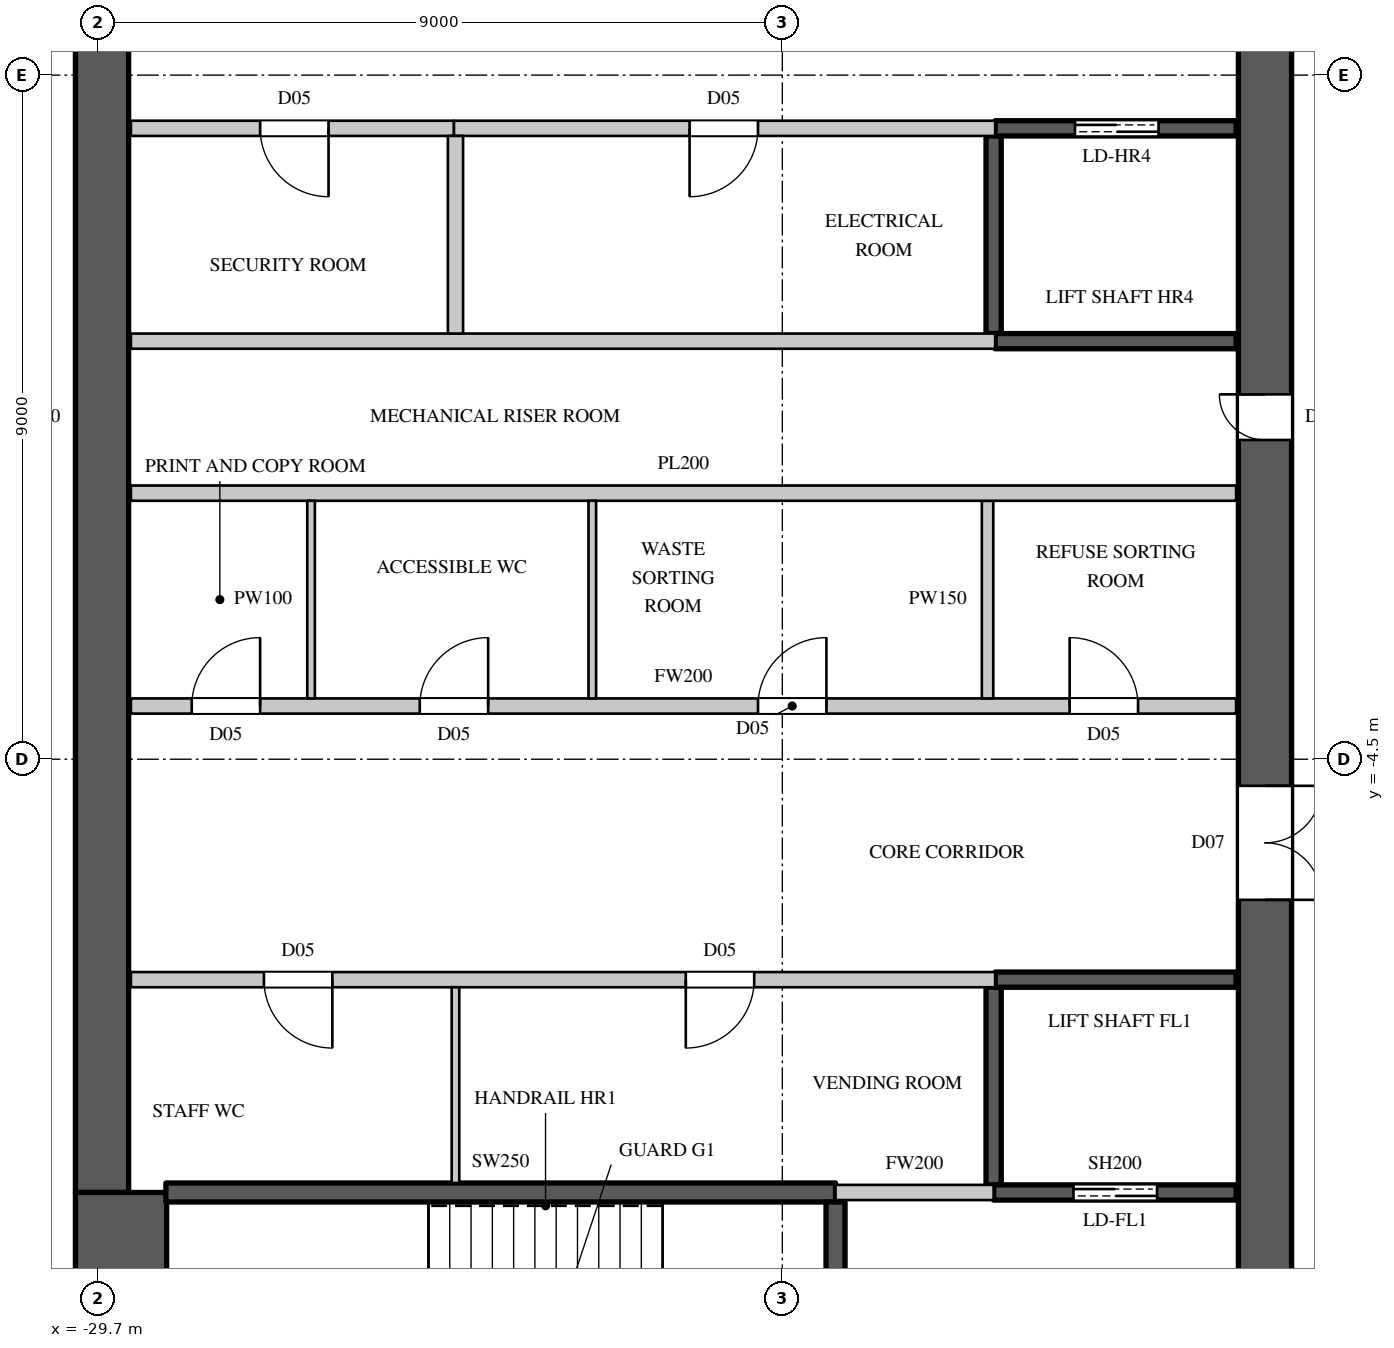
"""IFC4 building model, lengths in metres.
Left out: names, types, materials, properties, quantities, classifications, styles, units other than length and angle.
Written with IfcOpenShell. Run it as: python <this file> out.ifc"""

import sys

from ifc_helpers import new_model, si_unit, direction, frame, frame_2d, origin, place, context, subcontext, project, spatial, rectangle, extrude, element, fill, save


model = new_model("IFC4")
c1 = context("Model", 3, precision=1e-05, world=origin(), true_north=direction((0.0, 1.0)))
c2 = subcontext(c1, "Body", "Model", "MODEL_VIEW")
j1 = project(units=[si_unit("LENGTHUNIT", "METRE"), si_unit("PLANEANGLEUNIT", "RADIAN")], contexts=[c1])
p1 = place(None, origin())
s1 = spatial("IfcSite", under=j1, at=p1, CompositionType="ELEMENT")
p2 = place(p1, origin())
s2 = spatial("IfcBuilding", under=s1, at=p2, CompositionType="ELEMENT")
p3 = place(p2, frame((0.0, 0.0, 272.1)))
s3 = spatial("IfcBuildingStorey", under=s2, at=p3, CompositionType="ELEMENT", Elevation=272.1)
p4 = place(p3, frame((-14.35, -14.8, 0.0), z_axis=(0.0, 0.0, 1.0), x_axis=(0.0, 1.0, 0.0)))
e1 = element("IfcWall", 1, at=p4, inside=s3, PredefinedType="SHEAR", context=c2, shape_type="SweptSolid", body=[
    extrude(rectangle(XDim=29.6, YDim=0.7, at=frame_2d((14.8, 0.0))), origin(), (0.0, 0.0, 1.0), 4.1),
])
p5 = place(p4, frame((1.55, 0.0, 0.0)))
e2 = element("IfcOpeningElement", 2, at=p5, cuts=e1, PredefinedType="OPENING", context=c2, shape_type="SweptSolid", body=[
    extrude(rectangle(XDim=1.5, YDim=2.4, at=frame_2d((0.75, 1.2))), frame((0.0, 0.36, 0.0), z_axis=(0.0, -1.0, 0.0), x_axis=(1.0, 0.0, 0.0)), (0.0, 0.0, 1.0), 0.72),
])
p6 = place(p4, frame((26.55, 0.0, 0.0)))
e3 = element("IfcOpeningElement", 3, at=p6, cuts=e1, PredefinedType="OPENING", context=c2, shape_type="SweptSolid", body=[
    extrude(rectangle(XDim=1.5, YDim=2.4, at=frame_2d((0.75, 1.2))), frame((0.0, 0.36, 0.0), z_axis=(0.0, -1.0, 0.0), x_axis=(1.0, 0.0, 0.0)), (0.0, 0.0, 1.0), 0.72),
])
p7 = place(p4, frame((8.45, 0.0, 0.0)))
e4 = element("IfcOpeningElement", 4, at=p7, cuts=e1, PredefinedType="OPENING", context=c2, shape_type="SweptSolid", body=[
    extrude(rectangle(XDim=1.5, YDim=2.4, at=frame_2d((0.75, 1.2))), frame((0.0, 0.36, 0.0), z_axis=(0.0, -1.0, 0.0), x_axis=(1.0, 0.0, 0.0)), (0.0, 0.0, 1.0), 0.72),
])
p8 = place(p4, frame((19.65, 0.0, 0.0)))
e5 = element("IfcOpeningElement", 5, at=p8, cuts=e1, PredefinedType="OPENING", context=c2, shape_type="SweptSolid", body=[
    extrude(rectangle(XDim=1.5, YDim=2.4, at=frame_2d((0.75, 1.2))), frame((0.0, 0.36, 0.0), z_axis=(0.0, -1.0, 0.0), x_axis=(1.0, 0.0, 0.0)), (0.0, 0.0, 1.0), 0.72),
])
p9 = place(p4, frame((14.5, 0.0, 0.0)))
e6 = element("IfcOpeningElement", 6, at=p9, cuts=e1, PredefinedType="OPENING", context=c2, shape_type="SweptSolid", body=[
    extrude(rectangle(XDim=0.6, YDim=2.0, at=frame_2d((0.3, 1.0))), frame((0.0, 0.36, 0.0), z_axis=(0.0, -1.0, 0.0), x_axis=(1.0, 0.0, 0.0)), (0.0, 0.0, 1.0), 0.72),
])
p10 = place(p3, frame((-29.65, -10.2, 0.0), z_axis=(0.0, 0.0, 1.0), x_axis=(0.0, 1.0, 0.0)))
e7 = element("IfcWall", 7, at=p10, inside=s3, PredefinedType="SHEAR", context=c2, shape_type="SweptSolid", body=[
    extrude(rectangle(XDim=20.4, YDim=0.7, at=frame_2d((10.2, 0.0))), origin(), (0.0, 0.0, 1.0), 4.1),
])
p11 = place(p3, frame((-29.4, -14.8, 0.0), z_axis=(0.0, 0.0, 1.0), x_axis=(0.0, 1.0, 0.0)))
e8 = element("IfcWall", 8, at=p11, inside=s3, PredefinedType="SHEAR", context=c2, shape_type="SweptSolid", body=[
    extrude(rectangle(XDim=4.6, YDim=1.2, at=frame_2d((2.3, 0.0))), origin(), (0.0, 0.0, 1.0), 4.1),
])
p12 = place(p3, frame((-29.27, -7.4, 0.0), z_axis=(0.0, 0.0, 1.0), x_axis=(1.0, 0.0, 0.0)))
e9 = element("IfcWall", 9, at=p12, inside=s3, PredefinedType="PARTITIONING", context=c2, shape_type="SweptSolid", body=[
    extrude(rectangle(XDim=11.37, YDim=0.2, at=frame_2d((5.685, 0.0))), origin(), (0.0, 0.0, 1.0), 3.8),
])
p13 = place(p12, frame((1.75, 0.0, 0.0)))
e10 = element("IfcOpeningElement", 10, at=p13, cuts=e9, PredefinedType="OPENING", context=c2, shape_type="SweptSolid", body=[
    extrude(rectangle(XDim=0.9, YDim=2.2, at=frame_2d((0.45, 1.1))), frame((0.0, 0.11, 0.0), z_axis=(0.0, -1.0, 0.0), x_axis=(1.0, 0.0, 0.0)), (0.0, 0.0, 1.0), 0.22),
])
p14 = place(p12, frame((7.3, 0.0, 0.0)))
e11 = element("IfcOpeningElement", 11, at=p14, cuts=e9, PredefinedType="OPENING", context=c2, shape_type="SweptSolid", body=[
    extrude(rectangle(XDim=0.9, YDim=2.2, at=frame_2d((0.45, 1.1))), frame((0.0, 0.11, 0.0), z_axis=(0.0, -1.0, 0.0), x_axis=(1.0, 0.0, 0.0)), (0.0, 0.0, 1.0), 0.22),
])
p15 = place(p3, frame((-29.27, -3.8, 0.0), z_axis=(0.0, 0.0, 1.0), x_axis=(1.0, 0.0, 0.0)))
e12 = element("IfcWall", 12, at=p15, inside=s3, PredefinedType="PARTITIONING", context=c2, shape_type="SweptSolid", body=[
    extrude(rectangle(XDim=14.54, YDim=0.2, at=frame_2d((7.27, 0.0))), origin(), (0.0, 0.0, 1.0), 3.8),
])
p16 = place(p15, frame((0.8, 0.0, 0.0)))
e13 = element("IfcOpeningElement", 13, at=p16, cuts=e12, PredefinedType="OPENING", context=c2, shape_type="SweptSolid", body=[
    extrude(rectangle(XDim=0.9, YDim=2.2, at=frame_2d((0.45, 1.1))), frame((0.0, 0.11, 0.0), z_axis=(0.0, -1.0, 0.0), x_axis=(1.0, 0.0, 0.0)), (0.0, 0.0, 1.0), 0.22),
])
p17 = place(p15, frame((3.8, 0.0, 0.0)))
e14 = element("IfcOpeningElement", 14, at=p17, cuts=e12, PredefinedType="OPENING", context=c2, shape_type="SweptSolid", body=[
    extrude(rectangle(XDim=0.9, YDim=2.2, at=frame_2d((0.45, 1.1))), frame((0.0, 0.11, 0.0), z_axis=(0.0, -1.0, 0.0), x_axis=(1.0, 0.0, 0.0)), (0.0, 0.0, 1.0), 0.22),
])
p18 = place(p15, frame((8.25, 0.0, 0.0)))
e15 = element("IfcOpeningElement", 15, at=p18, cuts=e12, PredefinedType="OPENING", context=c2, shape_type="SweptSolid", body=[
    extrude(rectangle(XDim=0.9, YDim=2.2, at=frame_2d((0.45, 1.1))), frame((0.0, 0.11, 0.0), z_axis=(0.0, -1.0, 0.0), x_axis=(1.0, 0.0, 0.0)), (0.0, 0.0, 1.0), 0.22),
])
p19 = place(p15, frame((12.35, 0.0, 0.0)))
e16 = element("IfcOpeningElement", 16, at=p19, cuts=e12, PredefinedType="OPENING", context=c2, shape_type="SweptSolid", body=[
    extrude(rectangle(XDim=0.9, YDim=2.2, at=frame_2d((0.45, 1.1))), frame((0.0, 0.11, 0.0), z_axis=(0.0, -1.0, 0.0), x_axis=(1.0, 0.0, 0.0)), (0.0, 0.0, 1.0), 0.22),
])
p20 = place(p3, frame((-29.27, 3.8, 0.0), z_axis=(0.0, 0.0, 1.0), x_axis=(1.0, 0.0, 0.0)))
e17 = element("IfcWall", 17, at=p20, inside=s3, PredefinedType="PARTITIONING", context=c2, shape_type="SweptSolid", body=[
    extrude(rectangle(XDim=4.25, YDim=0.2, at=frame_2d((2.125, 0.0))), origin(), (0.0, 0.0, 1.0), 3.8),
])
p21 = place(p20, frame((1.7, 0.0, 0.0)))
e18 = element("IfcOpeningElement", 18, at=p21, cuts=e17, PredefinedType="OPENING", context=c2, shape_type="SweptSolid", body=[
    extrude(rectangle(XDim=0.9, YDim=2.2, at=frame_2d((0.45, 1.1))), frame((0.0, 0.11, 0.0), z_axis=(0.0, -1.0, 0.0), x_axis=(1.0, 0.0, 0.0)), (0.0, 0.0, 1.0), 0.22),
])
p22 = place(p3, frame((-20.0, -10.2, 0.0), z_axis=(0.0, 0.0, 1.0), x_axis=(1.0, 0.0, 0.0)))
e19 = element("IfcWall", 19, at=p22, inside=s3, PredefinedType="PARTITIONING", context=c2, shape_type="SweptSolid", body=[
    extrude(rectangle(XDim=2.08, YDim=0.2, at=frame_2d((1.04, 0.0))), origin(), (0.0, 0.0, 1.0), 3.8),
])
p23 = place(p3, frame((-18.0, -3.7, 0.0), z_axis=(0.0, 0.0, 1.0), x_axis=(0.0, 1.0, 0.0)))
e20 = element("IfcWall", 20, at=p23, inside=s3, PredefinedType="PARTITIONING", context=c2, shape_type="SweptSolid", body=[
    extrude(rectangle(XDim=2.6, YDim=0.15, at=frame_2d((1.3, 0.0))), origin(), (0.0, 0.0, 1.0), 3.8),
])
p24 = place(p3, frame((-29.27, -1.0, 0.0), z_axis=(0.0, 0.0, 1.0), x_axis=(1.0, 0.0, 0.0)))
e21 = element("IfcWall", 21, at=p24, inside=s3, PredefinedType="PARTITIONING", context=c2, shape_type="SweptSolid", body=[
    extrude(rectangle(XDim=14.54, YDim=0.2, at=frame_2d((7.27, 0.0))), origin(), (0.0, 0.0, 1.0), 3.8),
])
p25 = place(p3, frame((-29.27, 1.0, 0.0), z_axis=(0.0, 0.0, 1.0), x_axis=(1.0, 0.0, 0.0)))
e22 = element("IfcWall", 22, at=p25, inside=s3, PredefinedType="PARTITIONING", context=c2, shape_type="SweptSolid", body=[
    extrude(rectangle(XDim=11.37, YDim=0.2, at=frame_2d((5.685, 0.0))), origin(), (0.0, 0.0, 1.0), 3.8),
])
p26 = place(p3, frame((-25.02, 3.8, 0.0), z_axis=(0.0, 0.0, 1.0), x_axis=(1.0, 0.0, 0.0)))
e23 = element("IfcWall", 23, at=p26, inside=s3, PredefinedType="PARTITIONING", context=c2, shape_type="SweptSolid", body=[
    extrude(rectangle(XDim=7.12, YDim=0.2, at=frame_2d((3.56, 0.0))), origin(), (0.0, 0.0, 1.0), 3.8),
])
p27 = place(p26, frame((3.1, 0.0, 0.0)))
e24 = element("IfcOpeningElement", 24, at=p27, cuts=e23, PredefinedType="OPENING", context=c2, shape_type="SweptSolid", body=[
    extrude(rectangle(XDim=0.9, YDim=2.2, at=frame_2d((0.45, 1.1))), frame((0.0, 0.11, 0.0), z_axis=(0.0, -1.0, 0.0), x_axis=(1.0, 0.0, 0.0)), (0.0, 0.0, 1.0), 0.22),
])
p28 = place(p3, frame((-25.0, 1.1, 0.0), z_axis=(0.0, 0.0, 1.0), x_axis=(0.0, 1.0, 0.0)))
e25 = element("IfcWall", 25, at=p28, inside=s3, PredefinedType="PARTITIONING", context=c2, shape_type="SweptSolid", body=[
    extrude(rectangle(XDim=2.6, YDim=0.2, at=frame_2d((1.3, 0.0))), origin(), (0.0, 0.0, 1.0), 3.8),
])
p29 = place(p3, frame((-17.92, -10.1, 0.0), z_axis=(0.0, 0.0, 1.0), x_axis=(0.0, 1.0, 0.0)))
e26 = element("IfcWall", 26, at=p29, inside=s3, PredefinedType="SHEAR", context=c2, shape_type="SweptSolid", body=[
    extrude(rectangle(XDim=2.6, YDim=0.2, at=frame_2d((1.3, 0.0))), origin(), (0.0, 0.0, 1.0), 3.8),
])
p30 = place(p3, frame((-17.92, -10.2, 0.0), z_axis=(0.0, 0.0, 1.0), x_axis=(1.0, 0.0, 0.0)))
e27 = element("IfcWall", 27, at=p30, inside=s3, PredefinedType="SHEAR", context=c2, shape_type="SweptSolid", body=[
    extrude(rectangle(XDim=3.19, YDim=0.2, at=frame_2d((1.595, 0.0))), origin(), (0.0, 0.0, 1.0), 3.8),
])
p31 = place(p30, frame((1.05, 0.0, 0.0)))
e28 = element("IfcOpeningElement", 28, at=p31, cuts=e27, PredefinedType="OPENING", context=c2, shape_type="SweptSolid", body=[
    extrude(rectangle(XDim=1.1, YDim=2.2, at=frame_2d((0.55, 1.1))), frame((0.0, 0.11, 0.0), z_axis=(0.0, -1.0, 0.0), x_axis=(1.0, 0.0, 0.0)), (0.0, 0.0, 1.0), 0.22),
])
p32 = place(p3, frame((-17.9, -7.4, 0.0), z_axis=(0.0, 0.0, 1.0), x_axis=(1.0, 0.0, 0.0)))
e29 = element("IfcWall", 29, at=p32, inside=s3, PredefinedType="SHEAR", context=c2, shape_type="SweptSolid", body=[
    extrude(rectangle(XDim=3.17, YDim=0.2, at=frame_2d((1.585, 0.0))), origin(), (0.0, 0.0, 1.0), 3.8),
])
p33 = place(p3, frame((-17.92, 1.1, 0.0), z_axis=(0.0, 0.0, 1.0), x_axis=(0.0, 1.0, 0.0)))
e30 = element("IfcWall", 30, at=p33, inside=s3, PredefinedType="SHEAR", context=c2, shape_type="SweptSolid", body=[
    extrude(rectangle(XDim=2.6, YDim=0.2, at=frame_2d((1.3, 0.0))), origin(), (0.0, 0.0, 1.0), 3.8),
])
p34 = place(p3, frame((-17.9, 1.0, 0.0), z_axis=(0.0, 0.0, 1.0), x_axis=(1.0, 0.0, 0.0)))
e31 = element("IfcWall", 31, at=p34, inside=s3, PredefinedType="SHEAR", context=c2, shape_type="SweptSolid", body=[
    extrude(rectangle(XDim=3.17, YDim=0.2, at=frame_2d((1.585, 0.0))), origin(), (0.0, 0.0, 1.0), 3.8),
])
p35 = place(p3, frame((-17.9, 3.8, 0.0), z_axis=(0.0, 0.0, 1.0), x_axis=(1.0, 0.0, 0.0)))
e32 = element("IfcWall", 32, at=p35, inside=s3, PredefinedType="SHEAR", context=c2, shape_type="SweptSolid", body=[
    extrude(rectangle(XDim=3.17, YDim=0.2, at=frame_2d((1.585, 0.0))), origin(), (0.0, 0.0, 1.0), 3.8),
])
p36 = place(p35, frame((1.05, 0.0, 0.0)))
e33 = element("IfcOpeningElement", 33, at=p36, cuts=e32, PredefinedType="OPENING", context=c2, shape_type="SweptSolid", body=[
    extrude(rectangle(XDim=1.1, YDim=2.2, at=frame_2d((0.55, 1.1))), frame((0.0, 0.11, 0.0), z_axis=(0.0, -1.0, 0.0), x_axis=(1.0, 0.0, 0.0)), (0.0, 0.0, 1.0), 0.22),
])
p37 = place(p3, frame((-28.81, -10.2, 0.0), z_axis=(0.0, 0.0, 1.0), x_axis=(1.0, 0.0, 0.0)))
e34 = element("IfcWall", 34, at=p37, inside=s3, PredefinedType="SHEAR", context=c2, shape_type="SweptSolid", body=[
    extrude(rectangle(XDim=8.81, YDim=0.25, at=frame_2d((4.405, 0.0))), origin(), (0.0, 0.0, 1.0), 3.8),
])
p38 = place(p3, frame((-20.0, -14.77, 0.0), z_axis=(0.0, 0.0, 1.0), x_axis=(0.0, 1.0, 0.0)))
e35 = element("IfcWall", 35, at=p38, inside=s3, PredefinedType="SHEAR", context=c2, shape_type="SweptSolid", body=[
    extrude(rectangle(XDim=4.445, YDim=0.25, at=frame_2d((2.223, 0.0))), origin(), (0.0, 0.0, 1.0), 3.8),
])
p39 = place(p38, frame((1.7, 0.0, 0.0)))
e36 = element("IfcOpeningElement", 36, at=p39, cuts=e35, PredefinedType="OPENING", context=c2, shape_type="SweptSolid", body=[
    extrude(rectangle(XDim=1.1, YDim=2.2, at=frame_2d((0.55, 1.1))), frame((0.0, 0.135, 0.0), z_axis=(0.0, -1.0, 0.0), x_axis=(1.0, 0.0, 0.0)), (0.0, 0.0, 1.0), 0.27),
])
p40 = place(p3, frame((-26.9, -3.7, 0.0), z_axis=(0.0, 0.0, 1.0), x_axis=(0.0, 1.0, 0.0)))
e37 = element("IfcWall", 37, at=p40, inside=s3, PredefinedType="PARTITIONING", context=c2, shape_type="SweptSolid", body=[
    extrude(rectangle(XDim=2.6, YDim=0.1, at=frame_2d((1.3, 0.0))), origin(), (0.0, 0.0, 1.0), 3.8),
])
p41 = place(p3, frame((-25.0, -10.075, 0.0), z_axis=(0.0, 0.0, 1.0), x_axis=(0.0, 1.0, 0.0)))
e38 = element("IfcWall", 38, at=p41, inside=s3, PredefinedType="PARTITIONING", context=c2, shape_type="SweptSolid", body=[
    extrude(rectangle(XDim=2.575, YDim=0.1, at=frame_2d((1.288, 0.0))), origin(), (0.0, 0.0, 1.0), 3.8),
])
p42 = place(p3, frame((-23.2, -3.7, 0.0), z_axis=(0.0, 0.0, 1.0), x_axis=(0.0, 1.0, 0.0)))
e39 = element("IfcWall", 39, at=p42, inside=s3, PredefinedType="PARTITIONING", context=c2, shape_type="SweptSolid", body=[
    extrude(rectangle(XDim=2.6, YDim=0.1, at=frame_2d((1.3, 0.0))), origin(), (0.0, 0.0, 1.0), 3.8),
])
p43 = place(p13, origin())
e40 = element("IfcDoor", 40, at=p43, inside=s3, OperationType="SINGLE_SWING_LEFT", PredefinedType="DOOR", context=c2, shape_type="SweptSolid", body=[
    extrude(rectangle(XDim=0.9, YDim=2.2, at=frame_2d((0.45, 1.1))), frame((0.0, 0.025, 0.0), z_axis=(0.0, -1.0, 0.0), x_axis=(1.0, 0.0, 0.0)), (0.0, 0.0, 1.0), 0.05),
])
fill(e10, e40)
p44 = place(p14, origin())
e41 = element("IfcDoor", 41, at=p44, inside=s3, OperationType="SINGLE_SWING_RIGHT", PredefinedType="DOOR", context=c2, shape_type="SweptSolid", body=[
    extrude(rectangle(XDim=0.9, YDim=2.2, at=frame_2d((0.45, 1.1))), frame((0.0, 0.025, 0.0), z_axis=(0.0, -1.0, 0.0), x_axis=(1.0, 0.0, 0.0)), (0.0, 0.0, 1.0), 0.05),
])
fill(e11, e41)
p45 = place(p16, origin())
e42 = element("IfcDoor", 42, at=p45, inside=s3, OperationType="SINGLE_SWING_RIGHT", PredefinedType="DOOR", context=c2, shape_type="SweptSolid", body=[
    extrude(rectangle(XDim=0.9, YDim=2.2, at=frame_2d((0.45, 1.1))), frame((0.0, 0.025, 0.0), z_axis=(0.0, -1.0, 0.0), x_axis=(1.0, 0.0, 0.0)), (0.0, 0.0, 1.0), 0.05),
])
fill(e13, e42)
p46 = place(p17, origin())
e43 = element("IfcDoor", 43, at=p46, inside=s3, OperationType="SINGLE_SWING_RIGHT", PredefinedType="DOOR", context=c2, shape_type="SweptSolid", body=[
    extrude(rectangle(XDim=0.9, YDim=2.2, at=frame_2d((0.45, 1.1))), frame((0.0, 0.025, 0.0), z_axis=(0.0, -1.0, 0.0), x_axis=(1.0, 0.0, 0.0)), (0.0, 0.0, 1.0), 0.05),
])
fill(e14, e43)
p47 = place(p18, origin())
e44 = element("IfcDoor", 44, at=p47, inside=s3, OperationType="SINGLE_SWING_RIGHT", PredefinedType="DOOR", context=c2, shape_type="SweptSolid", body=[
    extrude(rectangle(XDim=0.9, YDim=2.2, at=frame_2d((0.45, 1.1))), frame((0.0, 0.025, 0.0), z_axis=(0.0, -1.0, 0.0), x_axis=(1.0, 0.0, 0.0)), (0.0, 0.0, 1.0), 0.05),
])
fill(e15, e44)
p48 = place(p19, origin())
e45 = element("IfcDoor", 45, at=p48, inside=s3, OperationType="SINGLE_SWING_LEFT", PredefinedType="DOOR", context=c2, shape_type="SweptSolid", body=[
    extrude(rectangle(XDim=0.9, YDim=2.2, at=frame_2d((0.45, 1.1))), frame((0.0, 0.025, 0.0), z_axis=(0.0, -1.0, 0.0), x_axis=(1.0, 0.0, 0.0)), (0.0, 0.0, 1.0), 0.05),
])
fill(e16, e45)
p49 = place(p21, origin())
e46 = element("IfcDoor", 46, at=p49, inside=s3, OperationType="SINGLE_SWING_LEFT", PredefinedType="DOOR", context=c2, shape_type="SweptSolid", body=[
    extrude(rectangle(XDim=0.9, YDim=2.2, at=frame_2d((0.45, 1.1))), frame((0.0, 0.025, 0.0), z_axis=(0.0, -1.0, 0.0), x_axis=(1.0, 0.0, 0.0)), (0.0, 0.0, 1.0), 0.05),
])
fill(e18, e46)
p50 = place(p27, origin())
e47 = element("IfcDoor", 47, at=p50, inside=s3, OperationType="SINGLE_SWING_RIGHT", PredefinedType="DOOR", context=c2, shape_type="SweptSolid", body=[
    extrude(rectangle(XDim=0.9, YDim=2.2, at=frame_2d((0.45, 1.1))), frame((0.0, 0.025, 0.0), z_axis=(0.0, -1.0, 0.0), x_axis=(1.0, 0.0, 0.0)), (0.0, 0.0, 1.0), 0.05),
])
fill(e24, e47)
p51 = place(p31, origin())
e48 = element("IfcDoor", 48, at=p51, inside=s3, OperationType="DOUBLE_DOOR_SLIDING", PredefinedType="DOOR", context=c2, shape_type="SweptSolid", body=[
    extrude(rectangle(XDim=1.1, YDim=2.2, at=frame_2d((0.55, 1.1))), frame((0.0, 0.025, 0.0), z_axis=(0.0, -1.0, 0.0), x_axis=(1.0, 0.0, 0.0)), (0.0, 0.0, 1.0), 0.05),
])
fill(e28, e48)
p52 = place(p36, origin())
e49 = element("IfcDoor", 49, at=p52, inside=s3, OperationType="DOUBLE_DOOR_SLIDING", PredefinedType="DOOR", context=c2, shape_type="SweptSolid", body=[
    extrude(rectangle(XDim=1.1, YDim=2.2, at=frame_2d((0.55, 1.1))), frame((0.0, 0.025, 0.0), z_axis=(0.0, -1.0, 0.0), x_axis=(1.0, 0.0, 0.0)), (0.0, 0.0, 1.0), 0.05),
])
fill(e33, e49)
p53 = place(p7, origin())
e50 = element("IfcDoor", 50, at=p53, inside=s3, OperationType="DOUBLE_DOOR_SINGLE_SWING", PredefinedType="DOOR", context=c2, shape_type="SweptSolid", body=[
    extrude(rectangle(XDim=1.5, YDim=2.4, at=frame_2d((0.75, 1.2))), frame((0.0, -0.295, 0.0), z_axis=(0.0, -1.0, 0.0), x_axis=(1.0, 0.0, 0.0)), (0.0, 0.0, 1.0), 0.05),
])
fill(e4, e50)
p54 = place(p9, origin())
e51 = element("IfcDoor", 51, at=p54, inside=s3, OperationType="SINGLE_SWING_RIGHT", PredefinedType="DOOR", context=c2, shape_type="SweptSolid", body=[
    extrude(rectangle(XDim=0.6, YDim=2.0, at=frame_2d((0.3, 1.0))), frame((0.0, 0.345, 0.0), z_axis=(0.0, -1.0, 0.0), x_axis=(1.0, 0.0, 0.0)), (0.0, 0.0, 1.0), 0.05),
])
fill(e6, e51)
save(model, sys.argv[1])
